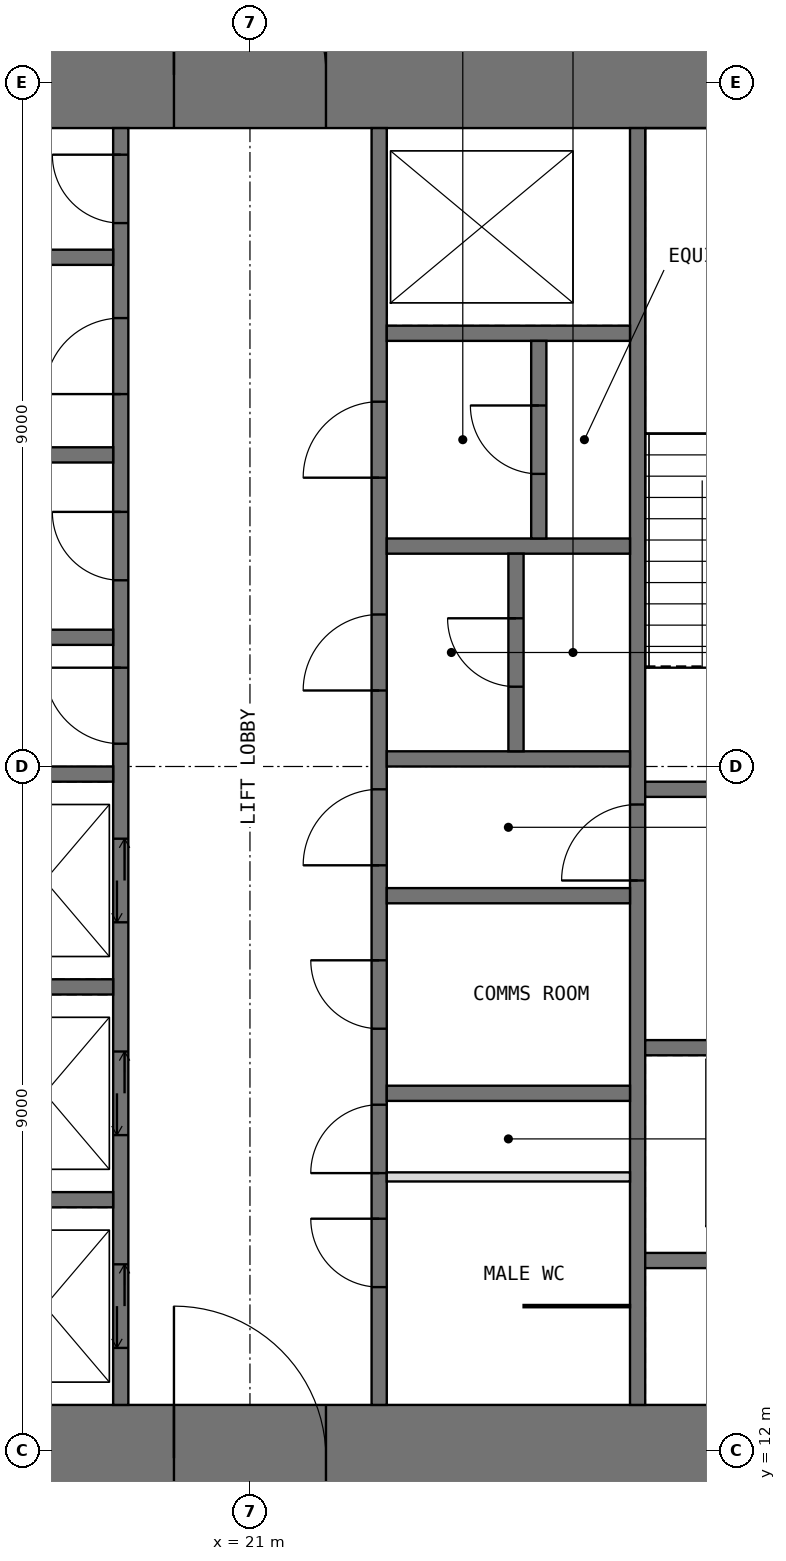
"""IFC4 building model, lengths in metres.
Left out: names, types, materials, properties, quantities, classifications, styles, units other than length and angle.
Written with IfcOpenShell. Run it as: python <this file> out.ifc"""

import sys

from ifc_helpers import new_model, si_unit, direction, frame, frame_2d, origin, place, context, subcontext, project, spatial, rectangle, extrude, element, fill, save


model = new_model("IFC4")
c1 = context("Model", 3, precision=1e-05, world=origin(), true_north=direction((0.0, 1.0)))
c2 = subcontext(c1, "Body", "Model", "MODEL_VIEW")
j1 = project(units=[si_unit("LENGTHUNIT", "METRE"), si_unit("PLANEANGLEUNIT", "RADIAN")], contexts=[c1])
p1 = place(None, origin())
s1 = spatial("IfcSite", under=j1, at=p1, CompositionType="ELEMENT")
p2 = place(p1, origin())
s2 = spatial("IfcBuilding", under=s1, at=p2, CompositionType="ELEMENT")
p3 = place(p2, frame((0.0, 0.0, 170.5)))
s3 = spatial("IfcBuildingStorey", under=s2, at=p3, CompositionType="ELEMENT", Elevation=170.5)
p4 = place(p3, frame((11.2, 11.9, -0.05), z_axis=(0.0, 0.0, 1.0), x_axis=(1.0, 0.0, 0.0)))
e1 = element("IfcWall", 1, at=p4, inside=s3, PredefinedType="SHEAR", context=c2, shape_type="SweptSolid", body=[
    extrude(rectangle(XDim=19.6, YDim=1.4, at=frame_2d((9.8, 0.0))), origin(), (0.0, 0.0, 1.0), 4.0),
])
p5 = place(p4, frame((8.8, 0.0, 0.05)))
e2 = element("IfcOpeningElement", 2, at=p5, cuts=e1, PredefinedType="OPENING", context=c2, shape_type="SweptSolid", body=[
    extrude(rectangle(XDim=2.0, YDim=2.2, at=frame_2d((1.0, 1.1))), frame((0.0, 0.71, 0.0), z_axis=(0.0, -1.0, 0.0), x_axis=(1.0, 0.0, 0.0)), (0.0, 0.0, 1.0), 1.42),
])
p6 = place(p3, frame((11.2, 30.1, -0.05), z_axis=(0.0, 0.0, 1.0), x_axis=(1.0, 0.0, 0.0)))
e3 = element("IfcWall", 3, at=p6, inside=s3, PredefinedType="SHEAR", context=c2, shape_type="SweptSolid", body=[
    extrude(rectangle(XDim=19.6, YDim=1.4, at=frame_2d((9.8, 0.0))), origin(), (0.0, 0.0, 1.0), 4.0),
])
p7 = place(p6, frame((8.8, 0.0, 0.05)))
e4 = element("IfcOpeningElement", 4, at=p7, cuts=e3, PredefinedType="OPENING", context=c2, shape_type="SweptSolid", body=[
    extrude(rectangle(XDim=2.0, YDim=2.2, at=frame_2d((1.0, 1.1))), frame((0.0, 0.71, 0.0), z_axis=(0.0, -1.0, 0.0), x_axis=(1.0, 0.0, 0.0)), (0.0, 0.0, 1.0), 1.42),
])
p8 = place(p3, frame((19.3, 12.6, -0.05), z_axis=(0.0, 0.0, 1.0), x_axis=(0.0, 1.0, 0.0)))
e5 = element("IfcWall", 5, at=p8, inside=s3, PredefinedType="SHEAR", context=c2, shape_type="SweptSolid", body=[
    extrude(rectangle(XDim=16.8, YDim=0.2, at=frame_2d((8.4, 0.0))), origin(), (0.0, 0.0, 1.0), 4.0),
])
p9 = place(p8, frame((8.7, 0.0, 0.05)))
e6 = element("IfcOpeningElement", 6, at=p9, cuts=e5, PredefinedType="OPENING", context=c2, shape_type="SweptSolid", body=[
    extrude(rectangle(XDim=1.0, YDim=2.2, at=frame_2d((0.5, 1.1))), frame((0.0, 0.11, 0.0), z_axis=(0.0, -1.0, 0.0), x_axis=(1.0, 0.0, 0.0)), (0.0, 0.0, 1.0), 0.22),
])
p10 = place(p8, frame((10.85, 0.0, 0.05)))
e7 = element("IfcOpeningElement", 7, at=p10, cuts=e5, PredefinedType="OPENING", context=c2, shape_type="SweptSolid", body=[
    extrude(rectangle(XDim=0.9, YDim=2.2, at=frame_2d((0.45, 1.1))), frame((0.0, 0.11, 0.0), z_axis=(0.0, -1.0, 0.0), x_axis=(1.0, 0.0, 0.0)), (0.0, 0.0, 1.0), 0.22),
])
p11 = place(p8, frame((13.3, 0.0, 0.05)))
e8 = element("IfcOpeningElement", 8, at=p11, cuts=e5, PredefinedType="OPENING", context=c2, shape_type="SweptSolid", body=[
    extrude(rectangle(XDim=1.0, YDim=2.2, at=frame_2d((0.5, 1.1))), frame((0.0, 0.11, 0.0), z_axis=(0.0, -1.0, 0.0), x_axis=(1.0, 0.0, 0.0)), (0.0, 0.0, 1.0), 0.22),
])
p12 = place(p8, frame((15.55, 0.0, 0.05)))
e9 = element("IfcOpeningElement", 9, at=p12, cuts=e5, PredefinedType="OPENING", context=c2, shape_type="SweptSolid", body=[
    extrude(rectangle(XDim=0.9, YDim=2.2, at=frame_2d((0.45, 1.1))), frame((0.0, 0.11, 0.0), z_axis=(0.0, -1.0, 0.0), x_axis=(1.0, 0.0, 0.0)), (0.0, 0.0, 1.0), 0.22),
])
p13 = place(p8, frame((0.75, 0.0, 0.05)))
e10 = element("IfcOpeningElement", 10, at=p13, cuts=e5, PredefinedType="OPENING", context=c2, shape_type="SweptSolid", body=[
    extrude(rectangle(XDim=1.1, YDim=2.2, at=frame_2d((0.55, 1.1))), frame((0.0, 0.11, 0.0), z_axis=(0.0, -1.0, 0.0), x_axis=(1.0, 0.0, 0.0)), (0.0, 0.0, 1.0), 0.22),
])
p14 = place(p8, frame((3.55, 0.0, 0.05)))
e11 = element("IfcOpeningElement", 11, at=p14, cuts=e5, PredefinedType="OPENING", context=c2, shape_type="SweptSolid", body=[
    extrude(rectangle(XDim=1.1, YDim=2.2, at=frame_2d((0.55, 1.1))), frame((0.0, 0.11, 0.0), z_axis=(0.0, -1.0, 0.0), x_axis=(1.0, 0.0, 0.0)), (0.0, 0.0, 1.0), 0.22),
])
p15 = place(p8, frame((6.35, 0.0, 0.05)))
e12 = element("IfcOpeningElement", 12, at=p15, cuts=e5, PredefinedType="OPENING", context=c2, shape_type="SweptSolid", body=[
    extrude(rectangle(XDim=1.1, YDim=2.2, at=frame_2d((0.55, 1.1))), frame((0.0, 0.11, 0.0), z_axis=(0.0, -1.0, 0.0), x_axis=(1.0, 0.0, 0.0)), (0.0, 0.0, 1.0), 0.22),
])
p16 = place(p3, frame((22.7, 12.6, -0.05), z_axis=(0.0, 0.0, 1.0), x_axis=(0.0, 1.0, 0.0)))
e13 = element("IfcWall", 13, at=p16, inside=s3, PredefinedType="SHEAR", context=c2, shape_type="SweptSolid", body=[
    extrude(rectangle(XDim=16.8, YDim=0.2, at=frame_2d((8.4, 0.0))), origin(), (0.0, 0.0, 1.0), 4.0),
])
p17 = place(p16, frame((3.05, 0.0, 0.05)))
e14 = element("IfcOpeningElement", 14, at=p17, cuts=e13, PredefinedType="OPENING", context=c2, shape_type="SweptSolid", body=[
    extrude(rectangle(XDim=0.9, YDim=2.2, at=frame_2d((0.45, 1.1))), frame((0.0, 0.11, 0.0), z_axis=(0.0, -1.0, 0.0), x_axis=(1.0, 0.0, 0.0)), (0.0, 0.0, 1.0), 0.22),
])
p18 = place(p16, frame((7.1, 0.0, 0.05)))
e15 = element("IfcOpeningElement", 15, at=p18, cuts=e13, PredefinedType="OPENING", context=c2, shape_type="SweptSolid", body=[
    extrude(rectangle(XDim=1.0, YDim=2.2, at=frame_2d((0.5, 1.1))), frame((0.0, 0.11, 0.0), z_axis=(0.0, -1.0, 0.0), x_axis=(1.0, 0.0, 0.0)), (0.0, 0.0, 1.0), 0.22),
])
p19 = place(p16, frame((1.55, 0.0, 0.05)))
e16 = element("IfcOpeningElement", 16, at=p19, cuts=e13, PredefinedType="OPENING", context=c2, shape_type="SweptSolid", body=[
    extrude(rectangle(XDim=0.9, YDim=2.2, at=frame_2d((0.45, 1.1))), frame((0.0, 0.11, 0.0), z_axis=(0.0, -1.0, 0.0), x_axis=(1.0, 0.0, 0.0)), (0.0, 0.0, 1.0), 0.22),
])
p20 = place(p16, frame((4.95, 0.0, 0.05)))
e17 = element("IfcOpeningElement", 17, at=p20, cuts=e13, PredefinedType="OPENING", context=c2, shape_type="SweptSolid", body=[
    extrude(rectangle(XDim=0.9, YDim=2.2, at=frame_2d((0.45, 1.1))), frame((0.0, 0.11, 0.0), z_axis=(0.0, -1.0, 0.0), x_axis=(1.0, 0.0, 0.0)), (0.0, 0.0, 1.0), 0.22),
])
p21 = place(p16, frame((9.4, 0.0, 0.05)))
e18 = element("IfcOpeningElement", 18, at=p21, cuts=e13, PredefinedType="OPENING", context=c2, shape_type="SweptSolid", body=[
    extrude(rectangle(XDim=1.0, YDim=2.2, at=frame_2d((0.5, 1.1))), frame((0.0, 0.11, 0.0), z_axis=(0.0, -1.0, 0.0), x_axis=(1.0, 0.0, 0.0)), (0.0, 0.0, 1.0), 0.22),
])
p22 = place(p16, frame((12.2, 0.0, 0.05)))
e19 = element("IfcOpeningElement", 19, at=p22, cuts=e13, PredefinedType="OPENING", context=c2, shape_type="SweptSolid", body=[
    extrude(rectangle(XDim=1.0, YDim=2.2, at=frame_2d((0.5, 1.1))), frame((0.0, 0.11, 0.0), z_axis=(0.0, -1.0, 0.0), x_axis=(1.0, 0.0, 0.0)), (0.0, 0.0, 1.0), 0.22),
])
p23 = place(p3, frame((26.1, 12.6, -0.05), z_axis=(0.0, 0.0, 1.0), x_axis=(0.0, 1.0, 0.0)))
e20 = element("IfcWall", 20, at=p23, inside=s3, PredefinedType="SHEAR", context=c2, shape_type="SweptSolid", body=[
    extrude(rectangle(XDim=16.8, YDim=0.2, at=frame_2d((8.4, 0.0))), origin(), (0.0, 0.0, 1.0), 4.0),
])
p24 = place(p23, frame((6.9, 0.0, 0.05)))
e21 = element("IfcOpeningElement", 21, at=p24, cuts=e20, PredefinedType="OPENING", context=c2, shape_type="SweptSolid", body=[
    extrude(rectangle(XDim=1.0, YDim=2.2, at=frame_2d((0.5, 1.1))), frame((0.0, 0.11, 0.0), z_axis=(0.0, -1.0, 0.0), x_axis=(1.0, 0.0, 0.0)), (0.0, 0.0, 1.0), 0.22),
])
for number, where, z_axis, x_axis in (
    (22, (16.0, 15.3, -0.05), (0.0, 0.0, 1.0), (1.0, 0.0, 0.0)),
    (23, (16.0, 18.1, -0.05), (0.0, 0.0, 1.0), (1.0, 0.0, 0.0)),
    (24, (16.0, 20.9, -0.05), (0.0, 0.0, 1.0), (1.0, 0.0, 0.0)),
    (25, (16.0, 22.7, -0.05), (0.0, 0.0, 1.0), (1.0, 0.0, 0.0)),
    (26, (16.0, 25.1, -0.05), (0.0, 0.0, 1.0), (1.0, 0.0, 0.0)),
    (27, (16.0, 27.7, -0.05), (0.0, 0.0, 1.0), (1.0, 0.0, 0.0)),
    (28, (22.8, 16.7, -0.05), (0.0, 0.0, 1.0), (1.0, 0.0, 0.0)),
    (29, (22.8, 19.3, -0.05), (0.0, 0.0, 1.0), (1.0, 0.0, 0.0)),
    (30, (22.8, 21.1, -0.05), (0.0, 0.0, 1.0), (1.0, 0.0, 0.0)),
    (31, (22.8, 23.9, -0.05), (0.0, 0.0, 1.0), (1.0, 0.0, 0.0)),
    (32, (22.8, 26.7, -0.05), (0.0, 0.0, 1.0), (1.0, 0.0, 0.0)),
    (33, (26.2, 14.5, -0.05), (0.0, 0.0, 1.0), (1.0, 0.0, 0.0)),
):
    element("IfcWall", number, at=place(p3, frame(where, z_axis=z_axis, x_axis=x_axis)), inside=s3, PredefinedType="SHEAR", context=c2, shape_type="SweptSolid", body=[
        extrude(rectangle(XDim=3.2, YDim=0.2, at=frame_2d((1.6, 0.0))), origin(), (0.0, 0.0, 1.0), 4.0),
    ])
p25 = place(p3, frame((26.2, 17.3, -0.05), z_axis=(0.0, 0.0, 1.0), x_axis=(1.0, 0.0, 0.0)))
e34 = element("IfcWall", 34, at=p25, inside=s3, PredefinedType="SHEAR", context=c2, shape_type="SweptSolid", body=[
    extrude(rectangle(XDim=3.2, YDim=0.2, at=frame_2d((1.6, 0.0))), origin(), (0.0, 0.0, 1.0), 4.0),
])
p26 = place(p25, frame((1.0, 0.0, 0.05)))
e35 = element("IfcOpeningElement", 35, at=p26, cuts=e34, PredefinedType="OPENING", context=c2, shape_type="SweptSolid", body=[
    extrude(rectangle(XDim=1.2, YDim=2.2, at=frame_2d((0.6, 1.1))), frame((0.0, 0.11, 0.0), z_axis=(0.0, -1.0, 0.0), x_axis=(1.0, 0.0, 0.0)), (0.0, 0.0, 1.0), 0.22),
])
p27 = place(p3, frame((26.2, 20.7, -0.05), z_axis=(0.0, 0.0, 1.0), x_axis=(1.0, 0.0, 0.0)))
e36 = element("IfcWall", 36, at=p27, inside=s3, PredefinedType="SHEAR", context=c2, shape_type="SweptSolid", body=[
    extrude(rectangle(XDim=3.2, YDim=0.2, at=frame_2d((1.6, 0.0))), origin(), (0.0, 0.0, 1.0), 4.0),
])
p28 = place(p27, frame((1.1, 0.0, 0.05)))
e37 = element("IfcOpeningElement", 37, at=p28, cuts=e36, PredefinedType="OPENING", context=c2, shape_type="SweptSolid", body=[
    extrude(rectangle(XDim=1.0, YDim=2.2, at=frame_2d((0.5, 1.1))), frame((0.0, 0.11, 0.0), z_axis=(0.0, -1.0, 0.0), x_axis=(1.0, 0.0, 0.0)), (0.0, 0.0, 1.0), 0.22),
])
p29 = place(p3, frame((22.8, 15.6, 0.0), z_axis=(0.0, 0.0, 1.0), x_axis=(1.0, 0.0, 0.0)))
e38 = element("IfcWall", 38, at=p29, inside=s3, PredefinedType="PARTITIONING", context=c2, shape_type="SweptSolid", body=[
    extrude(rectangle(XDim=3.2, YDim=0.12, at=frame_2d((1.6, 0.0))), origin(), (0.0, 0.0, 1.0), 3.75),
])
p30 = place(p3, frame((24.6, 13.9, 0.0), z_axis=(0.0, 0.0, 1.0), x_axis=(1.0, 0.0, 0.0)))
e39 = element("IfcWall", 39, at=p30, inside=s3, PredefinedType="PARTITIONING", context=c2, shape_type="SweptSolid", body=[
    extrude(rectangle(XDim=1.4, YDim=0.03, at=frame_2d((0.7, 0.0))), origin(), (0.0, 0.0, 1.0), 3.75),
])
p31 = place(p3, frame((24.5, 21.2, -0.05), z_axis=(0.0, 0.0, 1.0), x_axis=(0.0, 1.0, 0.0)))
e40 = element("IfcWall", 40, at=p31, inside=s3, PredefinedType="SHEAR", context=c2, shape_type="SweptSolid", body=[
    extrude(rectangle(XDim=2.6, YDim=0.2, at=frame_2d((1.3, 0.0))), origin(), (0.0, 0.0, 1.0), 4.0),
])
p32 = place(p31, frame((0.85, 0.0, 0.05)))
e41 = element("IfcOpeningElement", 41, at=p32, cuts=e40, PredefinedType="OPENING", context=c2, shape_type="SweptSolid", body=[
    extrude(rectangle(XDim=0.9, YDim=2.2, at=frame_2d((0.45, 1.1))), frame((0.0, 0.11, 0.0), z_axis=(0.0, -1.0, 0.0), x_axis=(1.0, 0.0, 0.0)), (0.0, 0.0, 1.0), 0.22),
])
p33 = place(p3, frame((24.8, 24.0, -0.05), z_axis=(0.0, 0.0, 1.0), x_axis=(0.0, 1.0, 0.0)))
e42 = element("IfcWall", 42, at=p33, inside=s3, PredefinedType="SHEAR", context=c2, shape_type="SweptSolid", body=[
    extrude(rectangle(XDim=2.6, YDim=0.2, at=frame_2d((1.3, 0.0))), origin(), (0.0, 0.0, 1.0), 4.0),
])
p34 = place(p33, frame((0.85, 0.0, 0.05)))
e43 = element("IfcOpeningElement", 43, at=p34, cuts=e42, PredefinedType="OPENING", context=c2, shape_type="SweptSolid", body=[
    extrude(rectangle(XDim=0.9, YDim=2.2, at=frame_2d((0.45, 1.1))), frame((0.0, 0.11, 0.0), z_axis=(0.0, -1.0, 0.0), x_axis=(1.0, 0.0, 0.0)), (0.0, 0.0, 1.0), 0.22),
])
p35 = place(p5, origin())
e44 = element("IfcDoor", 44, at=p35, inside=s3, OperationType="DOUBLE_DOOR_SINGLE_SWING", PredefinedType="DOOR", context=c2, shape_type="SweptSolid", body=[
    extrude(rectangle(XDim=2.0, YDim=2.2, at=frame_2d((1.0, 1.1))), frame((0.0, 0.025, 0.0), z_axis=(0.0, -1.0, 0.0), x_axis=(1.0, 0.0, 0.0)), (0.0, 0.0, 1.0), 0.05),
])
fill(e2, e44)
p36 = place(p7, origin())
e45 = element("IfcDoor", 45, at=p36, inside=s3, OperationType="DOUBLE_DOOR_SINGLE_SWING", PredefinedType="DOOR", context=c2, shape_type="SweptSolid", body=[
    extrude(rectangle(XDim=2.0, YDim=2.2, at=frame_2d((1.0, 1.1))), frame((0.0, 0.025, 0.0), z_axis=(0.0, -1.0, 0.0), x_axis=(1.0, 0.0, 0.0)), (0.0, 0.0, 1.0), 0.05),
])
fill(e4, e45)
p37 = place(p17, origin())
e46 = element("IfcDoor", 46, at=p37, inside=s3, OperationType="SINGLE_SWING_LEFT", PredefinedType="DOOR", context=c2, shape_type="SweptSolid", body=[
    extrude(rectangle(XDim=0.9, YDim=2.2, at=frame_2d((0.45, 1.1))), frame((0.0, 0.025, 0.0), z_axis=(0.0, -1.0, 0.0), x_axis=(1.0, 0.0, 0.0)), (0.0, 0.0, 1.0), 0.05),
])
fill(e14, e46)
p38 = place(p24, origin())
e47 = element("IfcDoor", 47, at=p38, inside=s3, OperationType="SINGLE_SWING_LEFT", PredefinedType="DOOR", context=c2, shape_type="SweptSolid", body=[
    extrude(rectangle(XDim=1.0, YDim=2.2, at=frame_2d((0.5, 1.1))), frame((0.0, 0.025, 0.0), z_axis=(0.0, -1.0, 0.0), x_axis=(1.0, 0.0, 0.0)), (0.0, 0.0, 1.0), 0.05),
])
fill(e21, e47)
p39 = place(p9, origin())
e48 = element("IfcDoor", 48, at=p39, inside=s3, OperationType="SINGLE_SWING_RIGHT", PredefinedType="DOOR", context=c2, shape_type="SweptSolid", body=[
    extrude(rectangle(XDim=1.0, YDim=2.2, at=frame_2d((0.5, 1.1))), frame((0.0, 0.025, 0.0), z_axis=(0.0, -1.0, 0.0), x_axis=(1.0, 0.0, 0.0)), (0.0, 0.0, 1.0), 0.05),
])
fill(e6, e48)
p40 = place(p18, origin())
e49 = element("IfcDoor", 49, at=p40, inside=s3, OperationType="SINGLE_SWING_LEFT", PredefinedType="DOOR", context=c2, shape_type="SweptSolid", body=[
    extrude(rectangle(XDim=1.0, YDim=2.2, at=frame_2d((0.5, 1.1))), frame((0.0, 0.025, 0.0), z_axis=(0.0, -1.0, 0.0), x_axis=(1.0, 0.0, 0.0)), (0.0, 0.0, 1.0), 0.05),
])
fill(e15, e49)
p41 = place(p10, origin())
e50 = element("IfcDoor", 50, at=p41, inside=s3, OperationType="SINGLE_SWING_RIGHT", PredefinedType="DOOR", context=c2, shape_type="SweptSolid", body=[
    extrude(rectangle(XDim=0.9, YDim=2.2, at=frame_2d((0.45, 1.1))), frame((0.0, 0.025, 0.0), z_axis=(0.0, -1.0, 0.0), x_axis=(1.0, 0.0, 0.0)), (0.0, 0.0, 1.0), 0.05),
])
fill(e7, e50)
p42 = place(p11, origin())
e51 = element("IfcDoor", 51, at=p42, inside=s3, OperationType="SINGLE_SWING_LEFT", PredefinedType="DOOR", context=c2, shape_type="SweptSolid", body=[
    extrude(rectangle(XDim=1.0, YDim=2.2, at=frame_2d((0.5, 1.1))), frame((0.0, 0.025, 0.0), z_axis=(0.0, -1.0, 0.0), x_axis=(1.0, 0.0, 0.0)), (0.0, 0.0, 1.0), 0.05),
])
fill(e8, e51)
p43 = place(p12, origin())
e52 = element("IfcDoor", 52, at=p43, inside=s3, OperationType="SINGLE_SWING_RIGHT", PredefinedType="DOOR", context=c2, shape_type="SweptSolid", body=[
    extrude(rectangle(XDim=0.9, YDim=2.2, at=frame_2d((0.45, 1.1))), frame((0.0, 0.025, 0.0), z_axis=(0.0, -1.0, 0.0), x_axis=(1.0, 0.0, 0.0)), (0.0, 0.0, 1.0), 0.05),
])
fill(e9, e52)
p44 = place(p19, origin())
e53 = element("IfcDoor", 53, at=p44, inside=s3, OperationType="SINGLE_SWING_RIGHT", PredefinedType="DOOR", context=c2, shape_type="SweptSolid", body=[
    extrude(rectangle(XDim=0.9, YDim=2.2, at=frame_2d((0.45, 1.1))), frame((0.0, 0.025, 0.0), z_axis=(0.0, -1.0, 0.0), x_axis=(1.0, 0.0, 0.0)), (0.0, 0.0, 1.0), 0.05),
])
fill(e16, e53)
p45 = place(p20, origin())
e54 = element("IfcDoor", 54, at=p45, inside=s3, OperationType="SINGLE_SWING_RIGHT", PredefinedType="DOOR", context=c2, shape_type="SweptSolid", body=[
    extrude(rectangle(XDim=0.9, YDim=2.2, at=frame_2d((0.45, 1.1))), frame((0.0, 0.025, 0.0), z_axis=(0.0, -1.0, 0.0), x_axis=(1.0, 0.0, 0.0)), (0.0, 0.0, 1.0), 0.05),
])
fill(e17, e54)
p46 = place(p21, origin())
e55 = element("IfcDoor", 55, at=p46, inside=s3, OperationType="SINGLE_SWING_LEFT", PredefinedType="DOOR", context=c2, shape_type="SweptSolid", body=[
    extrude(rectangle(XDim=1.0, YDim=2.2, at=frame_2d((0.5, 1.1))), frame((0.0, 0.025, 0.0), z_axis=(0.0, -1.0, 0.0), x_axis=(1.0, 0.0, 0.0)), (0.0, 0.0, 1.0), 0.05),
])
fill(e18, e55)
p47 = place(p32, origin())
e56 = element("IfcDoor", 56, at=p47, inside=s3, OperationType="SINGLE_SWING_RIGHT", PredefinedType="DOOR", context=c2, shape_type="SweptSolid", body=[
    extrude(rectangle(XDim=0.9, YDim=2.2, at=frame_2d((0.45, 1.1))), frame((0.0, 0.025, 0.0), z_axis=(0.0, -1.0, 0.0), x_axis=(1.0, 0.0, 0.0)), (0.0, 0.0, 1.0), 0.05),
])
fill(e41, e56)
p48 = place(p22, origin())
e57 = element("IfcDoor", 57, at=p48, inside=s3, OperationType="SINGLE_SWING_LEFT", PredefinedType="DOOR", context=c2, shape_type="SweptSolid", body=[
    extrude(rectangle(XDim=1.0, YDim=2.2, at=frame_2d((0.5, 1.1))), frame((0.0, 0.025, 0.0), z_axis=(0.0, -1.0, 0.0), x_axis=(1.0, 0.0, 0.0)), (0.0, 0.0, 1.0), 0.05),
])
fill(e19, e57)
p49 = place(p34, origin())
e58 = element("IfcDoor", 58, at=p49, inside=s3, OperationType="SINGLE_SWING_RIGHT", PredefinedType="DOOR", context=c2, shape_type="SweptSolid", body=[
    extrude(rectangle(XDim=0.9, YDim=2.2, at=frame_2d((0.45, 1.1))), frame((0.0, 0.025, 0.0), z_axis=(0.0, -1.0, 0.0), x_axis=(1.0, 0.0, 0.0)), (0.0, 0.0, 1.0), 0.05),
])
fill(e43, e58)
p50 = place(p13, origin())
e59 = element("IfcDoor", 59, at=p50, inside=s3, OperationType="DOUBLE_DOOR_SLIDING", PredefinedType="DOOR", context=c2, shape_type="SweptSolid", body=[
    extrude(rectangle(XDim=1.1, YDim=2.2, at=frame_2d((0.55, 1.1))), frame((0.0, 0.025, 0.0), z_axis=(0.0, -1.0, 0.0), x_axis=(1.0, 0.0, 0.0)), (0.0, 0.0, 1.0), 0.05),
])
fill(e10, e59)
p51 = place(p14, origin())
e60 = element("IfcDoor", 60, at=p51, inside=s3, OperationType="DOUBLE_DOOR_SLIDING", PredefinedType="DOOR", context=c2, shape_type="SweptSolid", body=[
    extrude(rectangle(XDim=1.1, YDim=2.2, at=frame_2d((0.55, 1.1))), frame((0.0, 0.025, 0.0), z_axis=(0.0, -1.0, 0.0), x_axis=(1.0, 0.0, 0.0)), (0.0, 0.0, 1.0), 0.05),
])
fill(e11, e60)
p52 = place(p15, origin())
e61 = element("IfcDoor", 61, at=p52, inside=s3, OperationType="DOUBLE_DOOR_SLIDING", PredefinedType="DOOR", context=c2, shape_type="SweptSolid", body=[
    extrude(rectangle(XDim=1.1, YDim=2.2, at=frame_2d((0.55, 1.1))), frame((0.0, 0.025, 0.0), z_axis=(0.0, -1.0, 0.0), x_axis=(1.0, 0.0, 0.0)), (0.0, 0.0, 1.0), 0.05),
])
fill(e12, e61)
save(model, sys.argv[1])
